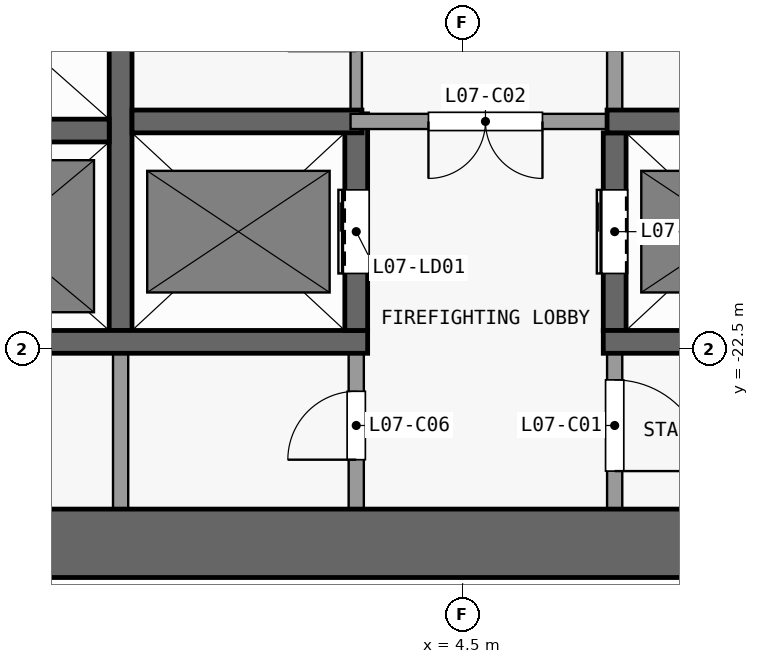
"""IFC4 building model, lengths in metres.
Left out: names, types, materials, properties, quantities, classifications, styles, units other than length and angle.
Written with IfcOpenShell. Run it as: python <this file> out.ifc"""

import sys

from ifc_helpers import new_model, si_unit, direction, frame, frame_2d, origin, place, context, subcontext, project, spatial, rectangle, extrude, element, fill, save


model = new_model("IFC4")
c1 = context("Model", 3, precision=1e-05, world=origin(), true_north=direction((0.0, 1.0)))
c2 = subcontext(c1, "Body", "Model", "MODEL_VIEW")
j1 = project(units=[si_unit("LENGTHUNIT", "METRE"), si_unit("PLANEANGLEUNIT", "RADIAN")], contexts=[c1])
p1 = place(None, origin())
s1 = spatial("IfcSite", under=j1, at=p1, CompositionType="ELEMENT")
p2 = place(p1, origin())
s2 = spatial("IfcBuilding", under=s1, at=p2, CompositionType="ELEMENT")
p3 = place(p2, frame((0.0, 0.0, 36.1)))
s3 = spatial("IfcBuildingStorey", under=s2, at=p3, CompositionType="ELEMENT", Elevation=36.1)
p4 = place(p3, frame((-13.5, -25.05, 0.0), z_axis=(0.0, 0.0, 1.0), x_axis=(1.0, 0.0, 0.0)))
e1 = element("IfcWall", 1, at=p4, inside=s3, PredefinedType="SHEAR", context=c2, shape_type="SweptSolid", body=[
    extrude(rectangle(XDim=27.0, YDim=0.9, at=frame_2d((13.5, 0.0))), origin(), (0.0, 0.0, 1.0), 3.3),
])
p5 = place(p3, frame((-2.95, -22.4, 0.0), z_axis=(0.0, 0.0, 1.0), x_axis=(1.0, 0.0, 0.0)))
e2 = element("IfcWall", 2, at=p5, inside=s3, PredefinedType="SHEAR", context=c2, shape_type="SweptSolid", body=[
    extrude(rectangle(XDim=6.2, YDim=0.3, at=frame_2d((3.1, 0.0))), origin(), (0.0, 0.0, 1.0), 3.3),
])
p6 = place(p3, frame((6.35, -22.4, 0.0), z_axis=(0.0, 0.0, 1.0), x_axis=(1.0, 0.0, 0.0)))
e3 = element("IfcWall", 3, at=p6, inside=s3, PredefinedType="SHEAR", context=c2, shape_type="SweptSolid", body=[
    extrude(rectangle(XDim=3.1, YDim=0.3, at=frame_2d((1.55, 0.0))), origin(), (0.0, 0.0, 1.0), 3.3),
])
p7 = place(p3, frame((-2.95, -19.62, 0.0), z_axis=(0.0, 0.0, 1.0), x_axis=(1.0, 0.0, 0.0)))
e4 = element("IfcWall", 4, at=p7, inside=s3, PredefinedType="SHEAR", context=c2, shape_type="SweptSolid", body=[
    extrude(rectangle(XDim=2.8, YDim=0.3, at=frame_2d((1.4, 0.0))), origin(), (0.0, 0.0, 1.0), 3.3),
])
p8 = place(p3, frame((0.15, -19.5, 0.0), z_axis=(0.0, 0.0, 1.0), x_axis=(1.0, 0.0, 0.0)))
e5 = element("IfcWall", 5, at=p8, inside=s3, PredefinedType="SHEAR", context=c2, shape_type="SweptSolid", body=[
    extrude(rectangle(XDim=3.025, YDim=0.3, at=frame_2d((1.513, 0.0))), origin(), (0.0, 0.0, 1.0), 3.3),
])
p9 = place(p3, frame((6.4, -19.5, 0.0), z_axis=(0.0, 0.0, 1.0), x_axis=(-1.0, 0.0, 0.0)))
e6 = element("IfcWall", 6, at=p9, inside=s3, PredefinedType="PARTITIONING", context=c2, shape_type="SweptSolid", body=[
    extrude(rectangle(XDim=3.375, YDim=0.2, at=frame_2d((1.688, 0.0))), origin(), (0.0, 0.0, 1.0), 3.3),
])
p10 = place(p9, frame((0.85, 0.0, 0.0)))
e7 = element("IfcOpeningElement", 7, at=p10, cuts=e6, PredefinedType="OPENING", context=c2, shape_type="SweptSolid", body=[
    extrude(rectangle(XDim=1.5, YDim=2.1, at=frame_2d((0.75, 1.05))), frame((0.0, 0.11, 0.0), z_axis=(0.0, -1.0, 0.0), x_axis=(1.0, 0.0, 0.0)), (0.0, 0.0, 1.0), 0.22),
])
p11 = place(p3, frame((6.4, -19.5, 0.0), z_axis=(0.0, 0.0, 1.0), x_axis=(1.0, 0.0, 0.0)))
e8 = element("IfcWall", 8, at=p11, inside=s3, PredefinedType="SHEAR", context=c2, shape_type="SweptSolid", body=[
    extrude(rectangle(XDim=3.05, YDim=0.3, at=frame_2d((1.525, 0.0))), origin(), (0.0, 0.0, 1.0), 3.3),
])
p12 = place(p3, frame((0.0, -24.6, 0.0), z_axis=(0.0, 0.0, 1.0), x_axis=(0.0, 1.0, 0.0)))
e9 = element("IfcWall", 9, at=p12, inside=s3, PredefinedType="PARTITIONING", context=c2, shape_type="SweptSolid", body=[
    extrude(rectangle(XDim=2.05, YDim=0.2, at=frame_2d((1.025, 0.0))), origin(), (0.0, 0.0, 1.0), 3.3),
])
p13 = place(p3, frame((0.0, -22.25, 0.0), z_axis=(0.0, 0.0, 1.0), x_axis=(0.0, 1.0, 0.0)))
e10 = element("IfcWall", 10, at=p13, inside=s3, PredefinedType="SHEAR", context=c2, shape_type="SweptSolid", body=[
    extrude(rectangle(XDim=13.75, YDim=0.3, at=frame_2d((6.875, 0.0))), origin(), (0.0, 0.0, 1.0), 3.3),
])
p14 = place(p3, frame((3.1, -24.6, 0.0), z_axis=(0.0, 0.0, 1.0), x_axis=(0.0, 1.0, 0.0)))
e11 = element("IfcWall", 11, at=p14, inside=s3, PredefinedType="PARTITIONING", context=c2, shape_type="SweptSolid", body=[
    extrude(rectangle(XDim=2.05, YDim=0.2, at=frame_2d((1.025, 0.0))), origin(), (0.0, 0.0, 1.0), 3.3),
])
p15 = place(p14, frame((0.65, 0.0, 0.0)))
e12 = element("IfcOpeningElement", 12, at=p15, cuts=e11, PredefinedType="OPENING", context=c2, shape_type="SweptSolid", body=[
    extrude(rectangle(XDim=0.9, YDim=2.1, at=frame_2d((0.45, 1.05))), frame((0.0, 0.11, 0.0), z_axis=(0.0, -1.0, 0.0), x_axis=(1.0, 0.0, 0.0)), (0.0, 0.0, 1.0), 0.22),
])
p16 = place(p3, frame((3.1, -22.25, 0.0), z_axis=(0.0, 0.0, 1.0), x_axis=(0.0, 1.0, 0.0)))
e13 = element("IfcWall", 13, at=p16, inside=s3, PredefinedType="SHEAR", context=c2, shape_type="SweptSolid", body=[
    extrude(rectangle(XDim=2.85, YDim=0.3, at=frame_2d((1.425, 0.0))), origin(), (0.0, 0.0, 1.0), 3.3),
])
p17 = place(p16, frame((0.75, 0.0, 0.0)))
e14 = element("IfcOpeningElement", 14, at=p17, cuts=e13, PredefinedType="OPENING", context=c2, shape_type="SweptSolid", body=[
    extrude(rectangle(XDim=1.1, YDim=2.1, at=frame_2d((0.55, 1.05))), frame((0.0, 0.16, 0.0), z_axis=(0.0, -1.0, 0.0), x_axis=(1.0, 0.0, 0.0)), (0.0, 0.0, 1.0), 0.32),
])
p18 = place(p3, frame((3.1, -19.4, 0.0), z_axis=(0.0, 0.0, 1.0), x_axis=(0.0, 1.0, 0.0)))
e15 = element("IfcWall", 15, at=p18, inside=s3, PredefinedType="PARTITIONING", context=c2, shape_type="SweptSolid", body=[
    extrude(rectangle(XDim=10.9, YDim=0.15, at=frame_2d((5.45, 0.0))), origin(), (0.0, 0.0, 1.0), 3.3),
])
p19 = place(p18, frame((0.825, 0.0, 0.0)))
e16 = element("IfcOpeningElement", 16, at=p19, cuts=e15, PredefinedType="OPENING", context=c2, shape_type="SweptSolid", body=[
    extrude(rectangle(XDim=0.9, YDim=2.1, at=frame_2d((0.45, 1.05))), frame((0.0, 0.085, 0.0), z_axis=(0.0, -1.0, 0.0), x_axis=(1.0, 0.0, 0.0)), (0.0, 0.0, 1.0), 0.17),
])
p20 = place(p18, frame((6.175, 0.0, 0.0)))
e17 = element("IfcOpeningElement", 17, at=p20, cuts=e15, PredefinedType="OPENING", context=c2, shape_type="SweptSolid", body=[
    extrude(rectangle(XDim=1.2, YDim=2.1, at=frame_2d((0.6, 1.05))), frame((0.0, 0.085, 0.0), z_axis=(0.0, -1.0, 0.0), x_axis=(1.0, 0.0, 0.0)), (0.0, 0.0, 1.0), 0.17),
])
p21 = place(p3, frame((6.5, -22.55, 0.0), z_axis=(0.0, 0.0, 1.0), x_axis=(0.0, -1.0, 0.0)))
e18 = element("IfcWall", 18, at=p21, inside=s3, PredefinedType="PARTITIONING", context=c2, shape_type="SweptSolid", body=[
    extrude(rectangle(XDim=2.05, YDim=0.2, at=frame_2d((1.025, 0.0))), origin(), (0.0, 0.0, 1.0), 3.3),
])
p22 = place(p21, frame((0.35, 0.0, 0.0)))
e19 = element("IfcOpeningElement", 19, at=p22, cuts=e18, PredefinedType="OPENING", context=c2, shape_type="SweptSolid", body=[
    extrude(rectangle(XDim=1.2, YDim=2.1, at=frame_2d((0.6, 1.05))), frame((0.0, 0.11, 0.0), z_axis=(0.0, -1.0, 0.0), x_axis=(1.0, 0.0, 0.0)), (0.0, 0.0, 1.0), 0.22),
])
p23 = place(p3, frame((6.5, -22.25, 0.0), z_axis=(0.0, 0.0, 1.0), x_axis=(0.0, 1.0, 0.0)))
e20 = element("IfcWall", 20, at=p23, inside=s3, PredefinedType="SHEAR", context=c2, shape_type="SweptSolid", body=[
    extrude(rectangle(XDim=2.6, YDim=0.3, at=frame_2d((1.3, 0.0))), origin(), (0.0, 0.0, 1.0), 3.3),
])
p24 = place(p23, frame((0.75, 0.0, 0.0)))
e21 = element("IfcOpeningElement", 21, at=p24, cuts=e20, PredefinedType="OPENING", context=c2, shape_type="SweptSolid", body=[
    extrude(rectangle(XDim=1.1, YDim=2.1, at=frame_2d((0.55, 1.05))), frame((0.0, 0.16, 0.0), z_axis=(0.0, -1.0, 0.0), x_axis=(1.0, 0.0, 0.0)), (0.0, 0.0, 1.0), 0.32),
])
p25 = place(p3, frame((6.5, -8.5, 0.0), z_axis=(0.0, 0.0, 1.0), x_axis=(0.0, -1.0, 0.0)))
e22 = element("IfcWall", 22, at=p25, inside=s3, PredefinedType="PARTITIONING", context=c2, shape_type="SweptSolid", body=[
    extrude(rectangle(XDim=10.85, YDim=0.2, at=frame_2d((5.425, 0.0))), origin(), (0.0, 0.0, 1.0), 3.3),
])
p26 = place(p25, frame((4.9, 0.0, 0.0)))
e23 = element("IfcOpeningElement", 23, at=p26, cuts=e22, PredefinedType="OPENING", context=c2, shape_type="SweptSolid", body=[
    extrude(rectangle(XDim=1.2, YDim=2.1, at=frame_2d((0.6, 1.05))), frame((0.0, 0.11, 0.0), z_axis=(0.0, -1.0, 0.0), x_axis=(1.0, 0.0, 0.0)), (0.0, 0.0, 1.0), 0.22),
])
p27 = place(p17, origin())
e24 = element("IfcDoor", 24, at=p27, inside=s3, OperationType="DOUBLE_DOOR_SLIDING", PredefinedType="DOOR", context=c2, shape_type="SweptSolid", body=[
    extrude(rectangle(XDim=1.1, YDim=2.1, at=frame_2d((0.55, 1.05))), frame((0.0, 0.025, 0.0), z_axis=(0.0, -1.0, 0.0), x_axis=(1.0, 0.0, 0.0)), (0.0, 0.0, 1.0), 0.05),
])
fill(e14, e24)
p28 = place(p24, origin())
e25 = element("IfcDoor", 25, at=p28, inside=s3, OperationType="DOUBLE_DOOR_SLIDING", PredefinedType="DOOR", context=c2, shape_type="SweptSolid", body=[
    extrude(rectangle(XDim=1.1, YDim=2.1, at=frame_2d((0.55, 1.05))), frame((0.0, 0.025, 0.0), z_axis=(0.0, -1.0, 0.0), x_axis=(1.0, 0.0, 0.0)), (0.0, 0.0, 1.0), 0.05),
])
fill(e21, e25)
p29 = place(p22, origin())
e26 = element("IfcDoor", 26, at=p29, inside=s3, OperationType="SINGLE_SWING_RIGHT", PredefinedType="DOOR", context=c2, shape_type="SweptSolid", body=[
    extrude(rectangle(XDim=1.2, YDim=2.1, at=frame_2d((0.6, 1.05))), frame((0.0, 0.025, 0.0), z_axis=(0.0, -1.0, 0.0), x_axis=(1.0, 0.0, 0.0)), (0.0, 0.0, 1.0), 0.05),
])
fill(e19, e26)
p30 = place(p10, origin())
e27 = element("IfcDoor", 27, at=p30, inside=s3, OperationType="DOUBLE_DOOR_SINGLE_SWING", PredefinedType="DOOR", context=c2, shape_type="SweptSolid", body=[
    extrude(rectangle(XDim=1.5, YDim=2.1, at=frame_2d((0.75, 1.05))), frame((0.0, 0.025, 0.0), z_axis=(0.0, -1.0, 0.0), x_axis=(1.0, 0.0, 0.0)), (0.0, 0.0, 1.0), 0.05),
])
fill(e7, e27)
p31 = place(p15, origin())
e28 = element("IfcDoor", 28, at=p31, inside=s3, OperationType="SINGLE_SWING_LEFT", PredefinedType="DOOR", context=c2, shape_type="SweptSolid", body=[
    extrude(rectangle(XDim=0.9, YDim=2.1, at=frame_2d((0.45, 1.05))), frame((0.0, 0.025, 0.0), z_axis=(0.0, -1.0, 0.0), x_axis=(1.0, 0.0, 0.0)), (0.0, 0.0, 1.0), 0.05),
])
fill(e12, e28)
save(model, sys.argv[1])
